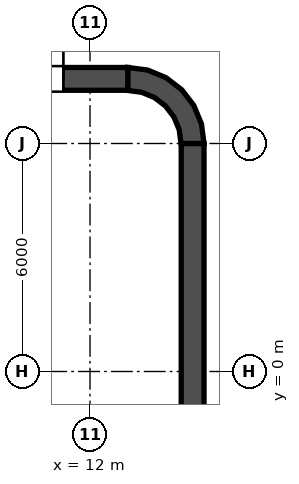
"""IFC4 building model, lengths in metres.
Left out: names, types, materials, properties, quantities, classifications, styles, units other than length and angle.
Written with IfcOpenShell. Run it as: python <this file> out.ifc"""

import sys

from ifc_helpers import new_model, si_unit, direction, frame, frame_2d, origin, place, context, subcontext, project, spatial, polyline, rectangle, outline, extrude, element, fill, save


model = new_model("IFC4")
c1 = context("Model", 3, precision=1e-05, world=origin(), true_north=direction((0.0, 1.0)))
c2 = subcontext(c1, "Body", "Model", "MODEL_VIEW")
j1 = project(units=[si_unit("LENGTHUNIT", "METRE"), si_unit("PLANEANGLEUNIT", "RADIAN")], contexts=[c1])
p1 = place(None, origin())
s1 = spatial("IfcSite", under=j1, at=p1, CompositionType="ELEMENT")
p2 = place(p1, origin())
s2 = spatial("IfcBuilding", under=s1, at=p2, CompositionType="ELEMENT")
p3 = place(p2, frame((0.0, 0.0, 96.6)))
s3 = spatial("IfcBuildingStorey", under=s2, at=p3, CompositionType="ELEMENT", Elevation=96.6)
p4 = place(p3, frame((-13.0, 7.7, 0.0), z_axis=(0.0, 0.0, 1.0), x_axis=(1.0, 0.0, 0.0)))
e1 = element("IfcWall", 1, at=p4, inside=s3, PredefinedType="SHEAR", context=c2, shape_type="SweptSolid", body=[
    extrude(rectangle(XDim=26.0, YDim=0.6, at=frame_2d((13.0, 0.0))), origin(), (0.0, 0.0, 1.0), 5.4),
])
p5 = place(p4, frame((1.7, 0.0, 0.0)))
e2 = element("IfcOpeningElement", 2, at=p5, cuts=e1, PredefinedType="OPENING", context=c2, shape_type="SweptSolid", body=[
    extrude(rectangle(XDim=1.8, YDim=2.1, at=frame_2d((0.9, 1.05))), frame((0.0, 0.3, 0.0), z_axis=(0.0, -1.0, 0.0), x_axis=(1.0, 0.0, 0.0)), (0.0, 0.0, 1.0), 0.6),
])
p6 = place(p4, frame((22.5, 0.0, 0.0)))
e3 = element("IfcOpeningElement", 3, at=p6, cuts=e1, PredefinedType="OPENING", context=c2, shape_type="SweptSolid", body=[
    extrude(rectangle(XDim=1.8, YDim=2.1, at=frame_2d((0.9, 1.05))), frame((0.0, 0.3, 0.0), z_axis=(0.0, -1.0, 0.0), x_axis=(1.0, 0.0, 0.0)), (0.0, 0.0, 1.0), 0.6),
])
p7 = place(p3, frame((14.7, -6.0, 0.0), z_axis=(0.0, 0.0, 1.0), x_axis=(0.0, 1.0, 0.0)))
e4 = element("IfcWall", 4, at=p7, inside=s3, PredefinedType="SHEAR", context=c2, shape_type="SweptSolid", body=[
    extrude(rectangle(XDim=12.0, YDim=0.6, at=frame_2d((6.0, 0.0))), origin(), (0.0, 0.0, 1.0), 5.4),
])
p8 = place(p3, origin())
e5 = element("IfcWall", 5, at=p8, inside=s3, PredefinedType="SHEAR", context=c2, shape_type="SweptSolid", body=[
    extrude(outline(polyline([(13.0, 8.0), (13.0, 7.395), (13.361, 7.347), (13.698, 7.208), (13.986, 6.986), (14.208, 6.698), (14.347, 6.361), (14.395, 6.0), (15.0, 6.0), (14.932, 6.518), (14.732, 7.0), (14.414, 7.414), (14.0, 7.732), (13.518, 7.932), (13.0, 8.0)])), origin(), (0.0, 0.0, 1.0), 5.4),
])
p9 = place(p3, frame((11.8, -7.4, 0.0), z_axis=(0.0, 0.0, 1.0), x_axis=(0.0, 1.0, 0.0)))
e6 = element("IfcWall", 6, at=p9, inside=s3, PredefinedType="SOLIDWALL", context=c2, shape_type="SweptSolid", body=[
    extrude(rectangle(XDim=14.8, YDim=0.4, at=frame_2d((7.4, 0.0))), origin(), (0.0, 0.0, 1.0), 5.25),
])
p10 = place(p9, frame((13.552, 0.0, 0.0)))
e7 = element("IfcOpeningElement", 7, at=p10, cuts=e6, PredefinedType="OPENING", context=c2, shape_type="SweptSolid", body=[
    extrude(rectangle(XDim=0.9, YDim=2.1, at=frame_2d((0.45, 1.05))), frame((0.0, 0.2, 0.0), z_axis=(0.0, -1.0, 0.0), x_axis=(1.0, 0.0, 0.0)), (0.0, 0.0, 1.0), 0.4),
])
p11 = place(p9, frame((0.347, 0.0, 0.0)))
e8 = element("IfcOpeningElement", 8, at=p11, cuts=e6, PredefinedType="OPENING", context=c2, shape_type="SweptSolid", body=[
    extrude(rectangle(XDim=0.9, YDim=2.1, at=frame_2d((0.45, 1.05))), frame((0.0, 0.2, 0.0), z_axis=(0.0, -1.0, 0.0), x_axis=(1.0, 0.0, 0.0)), (0.0, 0.0, 1.0), 0.4),
])
e9 = element("IfcWall", 9, at=p8, inside=s3, PredefinedType="SOLIDWALL", context=c2, shape_type="SweptSolid", body=[
    extrude(outline(polyline([(12.0, -5.675), (12.0, -5.925), (14.15, -5.925), (14.4, -5.925), (14.4, -5.675), (14.4, -3.025), (14.4, -2.775), (14.4, -0.125), (14.4, 0.125), (14.4, 2.775), (14.4, 3.025), (14.4, 5.675), (14.4, 5.925), (14.15, 5.925), (12.0, 5.925), (12.0, 5.675), (14.15, 5.675), (14.15, 3.025), (12.0, 3.025), (12.0, 2.775), (14.15, 2.775), (14.15, 0.125), (12.0, 0.125), (12.0, -0.125), (14.15, -0.125), (14.15, -2.775), (12.0, -2.775), (12.0, -3.025), (14.15, -3.025), (14.15, -5.675), (12.0, -5.675)])), origin(), (0.0, 0.0, 1.0), 5.25),
])
p12 = place(p10, origin())
e10 = element("IfcDoor", 10, at=p12, inside=s3, OperationType="SINGLE_SWING_RIGHT", PredefinedType="DOOR", context=c2, shape_type="SweptSolid", body=[
    extrude(rectangle(XDim=0.9, YDim=2.1, at=frame_2d((0.45, 1.05))), frame((0.0, 0.025, 0.0), z_axis=(0.0, -1.0, 0.0), x_axis=(1.0, 0.0, 0.0)), (0.0, 0.0, 1.0), 0.05),
])
fill(e7, e10)
p13 = place(p6, origin())
e11 = element("IfcDoor", 11, at=p13, inside=s3, OperationType="DOUBLE_DOOR_SINGLE_SWING", PredefinedType="DOOR", context=c2, shape_type="SweptSolid", body=[
    extrude(rectangle(XDim=1.8, YDim=2.1, at=frame_2d((0.9, 1.05))), frame((0.0, 0.025, 0.0), z_axis=(0.0, -1.0, 0.0), x_axis=(1.0, 0.0, 0.0)), (0.0, 0.0, 1.0), 0.05),
])
fill(e3, e11)
save(model, sys.argv[1])
